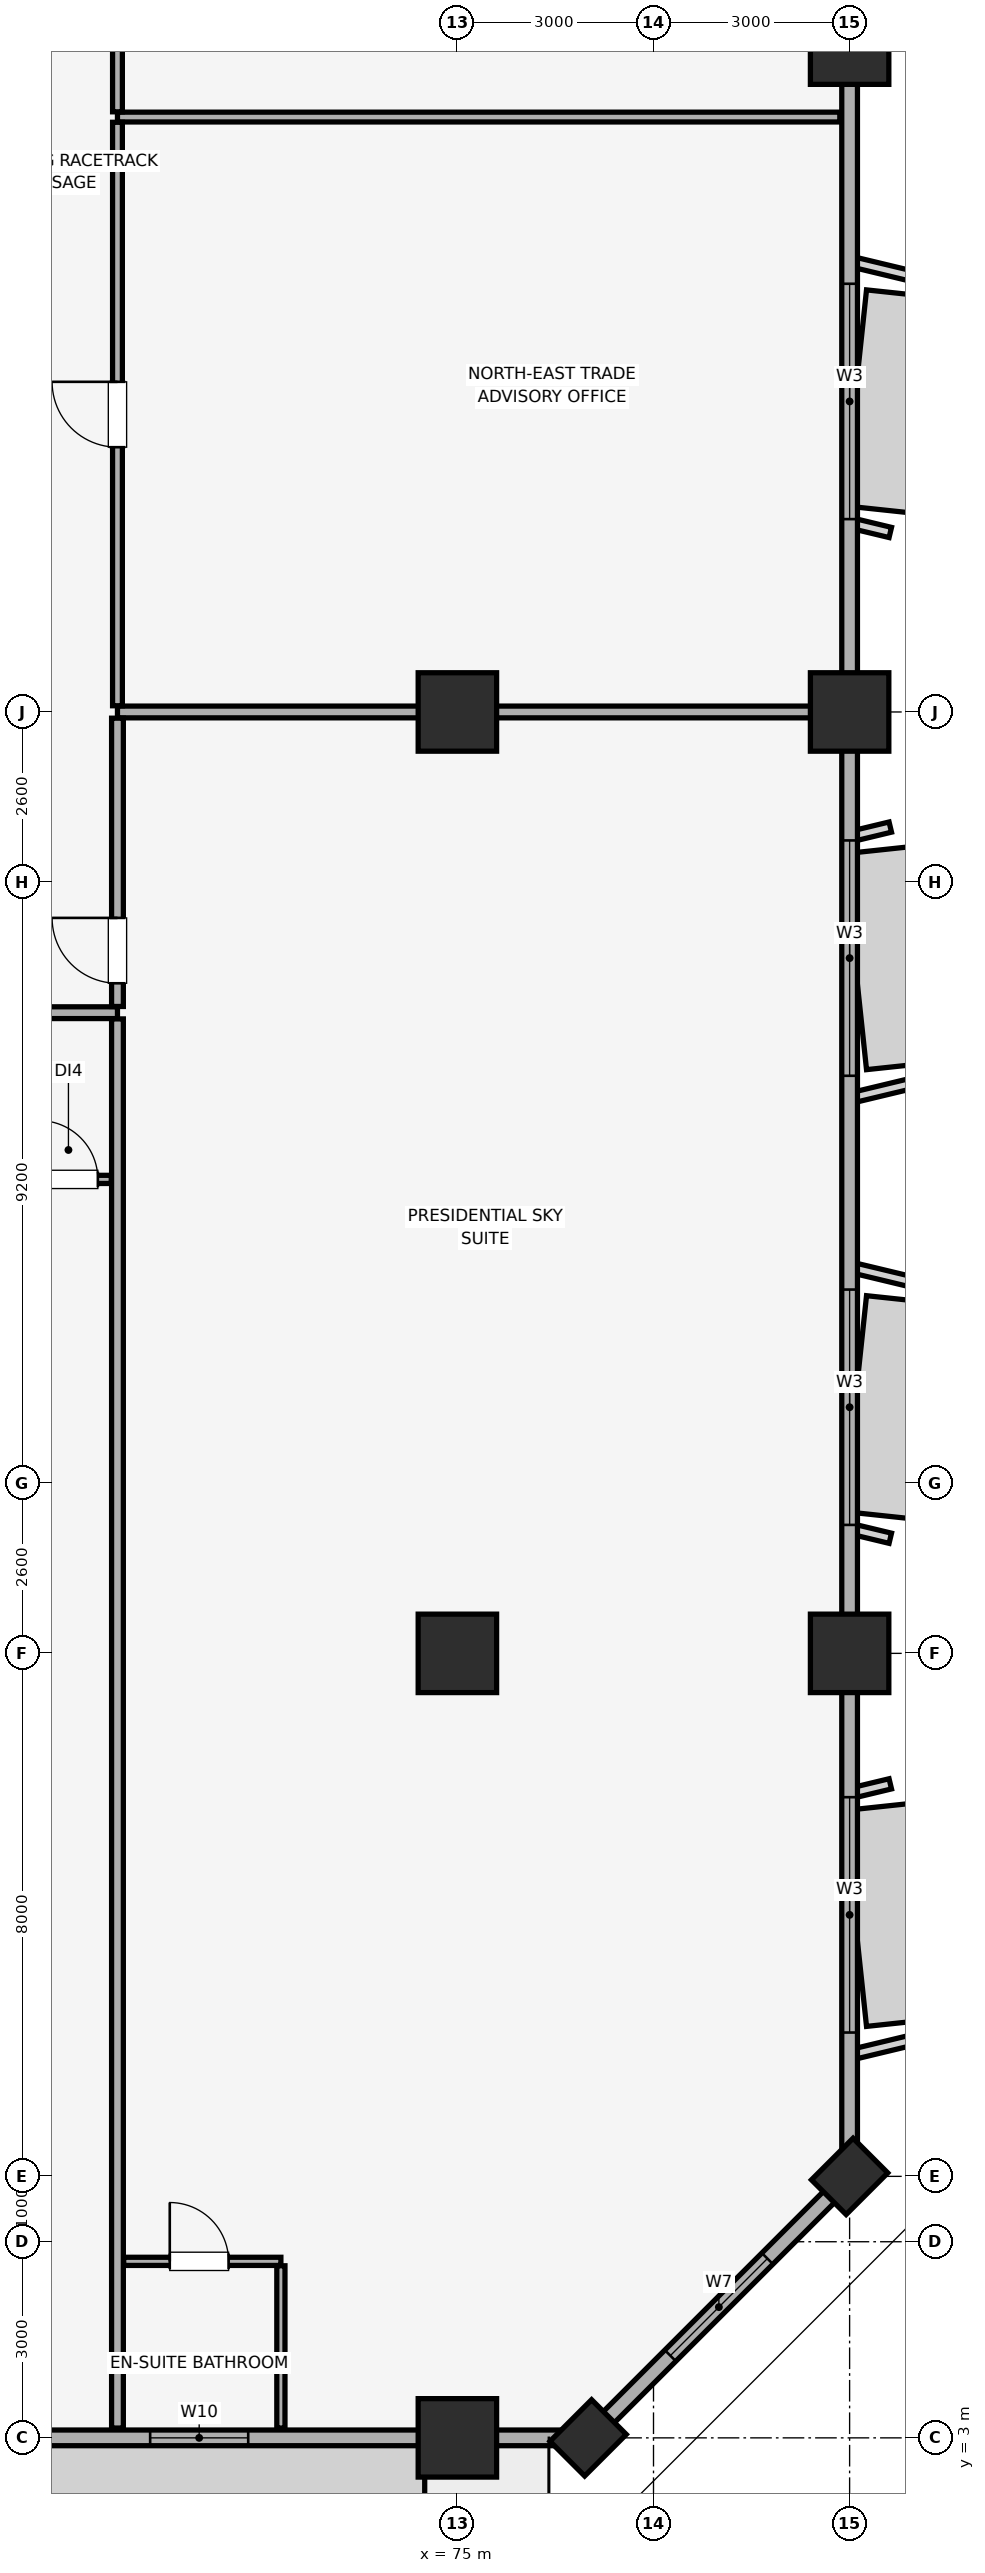
"""IFC4 building model, lengths in metres.
Left out: names, types, materials, properties, quantities, classifications, styles, units other than length and angle.
Written with IfcOpenShell. Run it as: python <this file> out.ifc"""

import sys

from ifc_helpers import new_model, si_unit, direction, frame, frame_2d, origin, origin_2d, place, context, subcontext, project, spatial, rectangle, extrude, element, fill, save


model = new_model("IFC4")
c1 = context("Model", 3, precision=1e-05, world=origin(), true_north=direction((0.0, 1.0)))
c2 = subcontext(c1, "Body", "Model", "MODEL_VIEW")
j1 = project(units=[si_unit("LENGTHUNIT", "METRE"), si_unit("PLANEANGLEUNIT", "RADIAN")], contexts=[c1])
p1 = place(None, origin())
s1 = spatial("IfcSite", under=j1, at=p1, CompositionType="ELEMENT")
p2 = place(p1, origin())
s2 = spatial("IfcBuilding", under=s1, at=p2, CompositionType="ELEMENT")
p3 = place(p2, frame((0.0, 0.0, 220.55)))
s3 = spatial("IfcBuildingStorey", under=s2, at=p3, CompositionType="ELEMENT", Elevation=220.55)
for number, where, z_axis, x_axis in (
    (1, (75.0, 3.0, 0.0), (0.0, 0.0, 1.0), (1.0, 0.0, 0.0)),
    (2, (81.0, 15.0, 0.0), (0.0, 0.0, 1.0), (1.0, 0.0, 0.0)),
    (3, (81.0, 29.4, 0.0), (0.0, 0.0, 1.0), (1.0, 0.0, 0.0)),
    (4, (81.0, 39.6, 0.0), (0.0, 0.0, 1.0), (1.0, 0.0, 0.0)),
):
    element("IfcColumn", number, at=place(p3, frame(where, z_axis=z_axis, x_axis=x_axis)), inside=s3, PredefinedType="COLUMN", context=c2, shape_type="SweptSolid", body=[
        extrude(rectangle(XDim=1.2, YDim=1.2, at=origin_2d()), origin(), (0.0, 0.0, 1.0), 3.56),
    ])
for number, where, z_axis, x_axis in (
    (5, (77.0, 3.0, 0.0), (0.0, 0.0, 1.0), (0.707, 0.707, 0.0)),
    (6, (81.0, 7.0, 0.0), (0.0, 0.0, 1.0), (0.707, 0.707, 0.0)),
):
    element("IfcColumn", number, at=place(p3, frame(where, z_axis=z_axis, x_axis=x_axis)), inside=s3, PredefinedType="PILASTER", context=c2, shape_type="SweptSolid", body=[
        extrude(rectangle(XDim=0.9, YDim=0.75, at=origin_2d()), origin(), (0.0, 0.0, 1.0), 3.56),
    ])
for number, where, z_axis, x_axis in (
    (7, (75.0, 15.0, 0.0), (0.0, 0.0, 1.0), (1.0, 0.0, 0.0)),
    (8, (75.0, 29.4, 0.0), (0.0, 0.0, 1.0), (1.0, 0.0, 0.0)),
):
    element("IfcColumn", number, at=place(p3, frame(where, z_axis=z_axis, x_axis=x_axis)), inside=s3, PredefinedType="COLUMN", context=c2, shape_type="SweptSolid", body=[
        extrude(rectangle(XDim=1.2, YDim=1.2, at=origin_2d()), origin(), (0.0, 0.0, 1.0), 3.56),
    ])
p4 = place(p3, frame((7.0, 3.0, 0.0), z_axis=(0.0, 0.0, 1.0), x_axis=(1.0, 0.0, 0.0)))
e9 = element("IfcWall", 9, at=p4, inside=s3, PredefinedType="SOLIDWALL", context=c2, shape_type="SweptSolid", body=[
    extrude(rectangle(XDim=70.0, YDim=0.24, at=frame_2d((35.0, 0.0))), origin(), (0.0, 0.0, 1.0), 2.76),
])
p5 = place(p4, frame((17.86, 0.0, 0.0)))
e10 = element("IfcOpeningElement", 10, at=p5, cuts=e9, PredefinedType="OPENING", context=c2, shape_type="SweptSolid", body=[
    extrude(rectangle(XDim=1.1, YDim=2.15, at=frame_2d((0.55, 1.075))), frame((0.0, 0.13, 0.0), z_axis=(0.0, -1.0, 0.0), x_axis=(1.0, 0.0, 0.0)), (0.0, 0.0, 1.0), 0.26),
])
p6 = place(p4, frame((26.317, 0.0, 0.0)))
e11 = element("IfcOpeningElement", 11, at=p6, cuts=e9, PredefinedType="OPENING", context=c2, shape_type="SweptSolid", body=[
    extrude(rectangle(XDim=1.1, YDim=2.15, at=frame_2d((0.55, 1.075))), frame((0.0, 0.13, 0.0), z_axis=(0.0, -1.0, 0.0), x_axis=(1.0, 0.0, 0.0)), (0.0, 0.0, 1.0), 0.26),
])
p7 = place(p4, frame((57.517, 0.0, 0.0)))
e12 = element("IfcOpeningElement", 12, at=p7, cuts=e9, PredefinedType="OPENING", context=c2, shape_type="SweptSolid", body=[
    extrude(rectangle(XDim=1.1, YDim=2.15, at=frame_2d((0.55, 1.075))), frame((0.0, 0.13, 0.0), z_axis=(0.0, -1.0, 0.0), x_axis=(1.0, 0.0, 0.0)), (0.0, 0.0, 1.0), 0.26),
])
p8 = place(p4, frame((5.2, 0.0, 0.85)))
e13 = element("IfcOpeningElement", 13, at=p8, cuts=e9, PredefinedType="OPENING", context=c2, shape_type="SweptSolid", body=[
    extrude(rectangle(XDim=1.5, YDim=1.4, at=frame_2d((0.75, 0.7))), frame((0.0, 0.13, 0.0), z_axis=(0.0, -1.0, 0.0), x_axis=(1.0, 0.0, 0.0)), (0.0, 0.0, 1.0), 0.26),
])
p9 = place(p4, frame((10.7, 0.0, 0.85)))
e14 = element("IfcOpeningElement", 14, at=p9, cuts=e9, PredefinedType="OPENING", context=c2, shape_type="SweptSolid", body=[
    extrude(rectangle(XDim=4.2, YDim=1.65, at=frame_2d((2.1, 0.825))), frame((0.0, 0.13, 0.0), z_axis=(0.0, -1.0, 0.0), x_axis=(1.0, 0.0, 0.0)), (0.0, 0.0, 1.0), 0.26),
])
p10 = place(p4, frame((28.243, 0.0, 0.85)))
e15 = element("IfcOpeningElement", 15, at=p10, cuts=e9, PredefinedType="OPENING", context=c2, shape_type="SweptSolid", body=[
    extrude(rectangle(XDim=1.5, YDim=1.4, at=frame_2d((0.75, 0.7))), frame((0.0, 0.13, 0.0), z_axis=(0.0, -1.0, 0.0), x_axis=(1.0, 0.0, 0.0)), (0.0, 0.0, 1.0), 0.26),
])
p11 = place(p4, frame((31.9, 0.0, 0.85)))
e16 = element("IfcOpeningElement", 16, at=p11, cuts=e9, PredefinedType="OPENING", context=c2, shape_type="SweptSolid", body=[
    extrude(rectangle(XDim=2.4, YDim=1.5, at=frame_2d((1.2, 0.75))), frame((0.0, 0.13, 0.0), z_axis=(0.0, -1.0, 0.0), x_axis=(1.0, 0.0, 0.0)), (0.0, 0.0, 1.0), 0.26),
])
p12 = place(p4, frame((35.7, 0.0, 0.85)))
e17 = element("IfcOpeningElement", 17, at=p12, cuts=e9, PredefinedType="OPENING", context=c2, shape_type="SweptSolid", body=[
    extrude(rectangle(XDim=2.4, YDim=1.5, at=frame_2d((1.2, 0.75))), frame((0.0, 0.13, 0.0), z_axis=(0.0, -1.0, 0.0), x_axis=(1.0, 0.0, 0.0)), (0.0, 0.0, 1.0), 0.26),
])
p13 = place(p4, frame((40.7, 0.0, 0.85)))
e18 = element("IfcOpeningElement", 18, at=p13, cuts=e9, PredefinedType="OPENING", context=c2, shape_type="SweptSolid", body=[
    extrude(rectangle(XDim=4.2, YDim=1.65, at=frame_2d((2.1, 0.825))), frame((0.0, 0.13, 0.0), z_axis=(0.0, -1.0, 0.0), x_axis=(1.0, 0.0, 0.0)), (0.0, 0.0, 1.0), 0.26),
])
p14 = place(p4, frame((49.85, 0.0, 0.85)))
e19 = element("IfcOpeningElement", 19, at=p14, cuts=e9, PredefinedType="OPENING", context=c2, shape_type="SweptSolid", body=[
    extrude(rectangle(XDim=2.4, YDim=1.5, at=frame_2d((1.2, 0.75))), frame((0.0, 0.13, 0.0), z_axis=(0.0, -1.0, 0.0), x_axis=(1.0, 0.0, 0.0)), (0.0, 0.0, 1.0), 0.26),
])
p15 = place(p4, frame((54.473, 0.0, 0.85)))
e20 = element("IfcOpeningElement", 20, at=p15, cuts=e9, PredefinedType="OPENING", context=c2, shape_type="SweptSolid", body=[
    extrude(rectangle(XDim=2.4, YDim=1.5, at=frame_2d((1.2, 0.75))), frame((0.0, 0.13, 0.0), z_axis=(0.0, -1.0, 0.0), x_axis=(1.0, 0.0, 0.0)), (0.0, 0.0, 1.0), 0.26),
])
p16 = place(p4, frame((63.3, 0.0, 0.85)))
e21 = element("IfcOpeningElement", 21, at=p16, cuts=e9, PredefinedType="OPENING", context=c2, shape_type="SweptSolid", body=[
    extrude(rectangle(XDim=1.5, YDim=1.4, at=frame_2d((0.75, 0.7))), frame((0.0, 0.13, 0.0), z_axis=(0.0, -1.0, 0.0), x_axis=(1.0, 0.0, 0.0)), (0.0, 0.0, 1.0), 0.26),
])
p17 = place(p3, frame((77.0, 3.0, 0.0), z_axis=(0.0, 0.0, 1.0), x_axis=(0.707106781187, 0.707106781187, 0.0)))
e22 = element("IfcWall", 22, at=p17, inside=s3, PredefinedType="SOLIDWALL", context=c2, shape_type="SweptSolid", body=[
    extrude(rectangle(XDim=5.657, YDim=0.24, at=frame_2d((2.828, 0.0))), origin(), (0.0, 0.0, 1.0), 2.76),
])
p18 = place(p17, frame((1.778, 0.0, 0.85)))
e23 = element("IfcOpeningElement", 23, at=p18, cuts=e22, PredefinedType="OPENING", context=c2, shape_type="SweptSolid", body=[
    extrude(rectangle(XDim=2.1, YDim=1.6, at=frame_2d((1.05, 0.8))), frame((0.0, 0.13, 0.0), z_axis=(0.0, -1.0, 0.0), x_axis=(1.0, 0.0, 0.0)), (0.0, 0.0, 1.0), 0.26),
])
p19 = place(p3, frame((81.0, 7.0, 0.0), z_axis=(0.0, 0.0, 1.0), x_axis=(0.0, 1.0, 0.0)))
e24 = element("IfcWall", 24, at=p19, inside=s3, PredefinedType="SOLIDWALL", context=c2, shape_type="SweptSolid", body=[
    extrude(rectangle(XDim=38.0, YDim=0.24, at=frame_2d((19.0, 0.0))), origin(), (0.0, 0.0, 1.0), 2.76),
])
p20 = place(p19, frame((2.2, 0.0, 0.85)))
e25 = element("IfcOpeningElement", 25, at=p20, cuts=e24, PredefinedType="OPENING", context=c2, shape_type="SweptSolid", body=[
    extrude(rectangle(XDim=3.6, YDim=1.65, at=frame_2d((1.8, 0.825))), frame((0.0, 0.13, 0.0), z_axis=(0.0, -1.0, 0.0), x_axis=(1.0, 0.0, 0.0)), (0.0, 0.0, 1.0), 0.26),
])
p21 = place(p19, frame((9.965, 0.0, 0.85)))
e26 = element("IfcOpeningElement", 26, at=p21, cuts=e24, PredefinedType="OPENING", context=c2, shape_type="SweptSolid", body=[
    extrude(rectangle(XDim=3.6, YDim=1.65, at=frame_2d((1.8, 0.825))), frame((0.0, 0.13, 0.0), z_axis=(0.0, -1.0, 0.0), x_axis=(1.0, 0.0, 0.0)), (0.0, 0.0, 1.0), 0.26),
])
p22 = place(p19, frame((16.835, 0.0, 0.85)))
e27 = element("IfcOpeningElement", 27, at=p22, cuts=e24, PredefinedType="OPENING", context=c2, shape_type="SweptSolid", body=[
    extrude(rectangle(XDim=3.6, YDim=1.65, at=frame_2d((1.8, 0.825))), frame((0.0, 0.13, 0.0), z_axis=(0.0, -1.0, 0.0), x_axis=(1.0, 0.0, 0.0)), (0.0, 0.0, 1.0), 0.26),
])
p23 = place(p19, frame((25.35, 0.0, 0.85)))
e28 = element("IfcOpeningElement", 28, at=p23, cuts=e24, PredefinedType="OPENING", context=c2, shape_type="SweptSolid", body=[
    extrude(rectangle(XDim=3.6, YDim=1.65, at=frame_2d((1.8, 0.825))), frame((0.0, 0.13, 0.0), z_axis=(0.0, -1.0, 0.0), x_axis=(1.0, 0.0, 0.0)), (0.0, 0.0, 1.0), 0.26),
])
p24 = place(p19, frame((33.915, 0.0, 0.85)))
e29 = element("IfcOpeningElement", 29, at=p24, cuts=e24, PredefinedType="OPENING", context=c2, shape_type="SweptSolid", body=[
    extrude(rectangle(XDim=3.0, YDim=1.5, at=frame_2d((1.5, 0.75))), frame((0.0, 0.13, 0.0), z_axis=(0.0, -1.0, 0.0), x_axis=(1.0, 0.0, 0.0)), (0.0, 0.0, 1.0), 0.26),
])
p25 = place(p3, frame((55.995, 24.8, 0.0), z_axis=(0.0, 0.0, 1.0), x_axis=(1.0, 0.0, 0.0)))
e30 = element("IfcWall", 30, at=p25, inside=s3, PredefinedType="PARTITIONING", context=c2, shape_type="SweptSolid", body=[
    extrude(rectangle(XDim=13.805, YDim=0.18, at=frame_2d((6.902, 0.0))), origin(), (0.0, 0.0, 1.0), 3.56),
])
p26 = place(p25, frame((7.395, 0.0, 0.0)))
e31 = element("IfcOpeningElement", 31, at=p26, cuts=e30, PredefinedType="OPENING", context=c2, shape_type="SweptSolid", body=[
    extrude(rectangle(XDim=1.0, YDim=2.15, at=frame_2d((0.5, 1.075))), frame((0.0, 0.1, 0.0), z_axis=(0.0, -1.0, 0.0), x_axis=(1.0, 0.0, 0.0)), (0.0, 0.0, 1.0), 0.2),
])
p27 = place(p3, frame((69.8, 3.15, 0.0), z_axis=(0.0, 0.0, 1.0), x_axis=(0.0, 1.0, 0.0)))
e32 = element("IfcWall", 32, at=p27, inside=s3, PredefinedType="PARTITIONING", context=c2, shape_type="SweptSolid", body=[
    extrude(rectangle(XDim=21.555, YDim=0.18, at=frame_2d((10.778, 0.0))), origin(), (0.0, 0.0, 1.0), 3.56),
])
p28 = place(p3, frame((67.3, 22.25, 0.0), z_axis=(0.0, 0.0, 1.0), x_axis=(1.0, 0.0, 0.0)))
e33 = element("IfcWall", 33, at=p28, inside=s3, PredefinedType="PARTITIONING", context=c2, shape_type="SweptSolid", body=[
    extrude(rectangle(XDim=2.405, YDim=0.125, at=frame_2d((1.203, 0.0))), origin(), (0.0, 0.0, 1.0), 3.56),
])
p29 = place(p28, frame((1.3, 0.0, 0.0)))
e34 = element("IfcOpeningElement", 34, at=p29, cuts=e33, PredefinedType="OPENING", context=c2, shape_type="SweptSolid", body=[
    extrude(rectangle(XDim=0.9, YDim=2.1, at=frame_2d((0.45, 1.05))), frame((0.0, 0.073, 0.0), z_axis=(0.0, -1.0, 0.0), x_axis=(1.0, 0.0, 0.0)), (0.0, 0.0, 1.0), 0.145),
])
p30 = place(p3, frame((69.8, 29.4, 0.0), z_axis=(0.0, 0.0, 1.0), x_axis=(1.0, 0.0, 0.0)))
e35 = element("IfcWall", 35, at=p30, inside=s3, PredefinedType="PARTITIONING", context=c2, shape_type="SweptSolid", body=[
    extrude(rectangle(XDim=11.05, YDim=0.18, at=frame_2d((5.525, 0.0))), origin(), (0.0, 0.0, 1.0), 2.719),
])
p31 = place(p3, frame((69.8, 24.895, 0.0), z_axis=(0.0, 0.0, 1.0), x_axis=(0.0, 1.0, 0.0)))
e36 = element("IfcWall", 36, at=p31, inside=s3, PredefinedType="PARTITIONING", context=c2, shape_type="SweptSolid", body=[
    extrude(rectangle(XDim=4.41, YDim=0.18, at=frame_2d((2.205, 0.0))), origin(), (0.0, 0.0, 1.0), 3.56),
])
p32 = place(p31, frame((0.355, 0.0, 0.0)))
e37 = element("IfcOpeningElement", 37, at=p32, cuts=e36, PredefinedType="OPENING", context=c2, shape_type="SweptSolid", body=[
    extrude(rectangle(XDim=1.0, YDim=2.15, at=frame_2d((0.5, 1.075))), frame((0.0, 0.1, 0.0), z_axis=(0.0, -1.0, 0.0), x_axis=(1.0, 0.0, 0.0)), (0.0, 0.0, 1.0), 0.2),
])
p33 = place(p3, frame((69.895, 5.7, 0.0), z_axis=(0.0, 0.0, 1.0), x_axis=(1.0, 0.0, 0.0)))
e38 = element("IfcWall", 38, at=p33, inside=s3, PredefinedType="PARTITIONING", context=c2, shape_type="SweptSolid", body=[
    extrude(rectangle(XDim=2.405, YDim=0.125, at=frame_2d((1.203, 0.0))), origin(), (0.0, 0.0, 1.0), 3.56),
])
p34 = place(p33, frame((0.705, 0.0, 0.0)))
e39 = element("IfcOpeningElement", 39, at=p34, cuts=e38, PredefinedType="OPENING", context=c2, shape_type="SweptSolid", body=[
    extrude(rectangle(XDim=0.9, YDim=2.1, at=frame_2d((0.45, 1.05))), frame((0.0, 0.073, 0.0), z_axis=(0.0, -1.0, 0.0), x_axis=(1.0, 0.0, 0.0)), (0.0, 0.0, 1.0), 0.145),
])
p35 = place(p3, frame((72.3, 3.15, 0.0), z_axis=(0.0, 0.0, 1.0), x_axis=(0.0, 1.0, 0.0)))
e40 = element("IfcWall", 40, at=p35, inside=s3, PredefinedType="PARTITIONING", context=c2, shape_type="SweptSolid", body=[
    extrude(rectangle(XDim=2.483, YDim=0.125, at=frame_2d((1.241, 0.0))), origin(), (0.0, 0.0, 1.0), 3.56),
])
p36 = place(p3, frame((69.8, 38.5, 0.0), z_axis=(0.0, 0.0, 1.0), x_axis=(1.0, 0.0, 0.0)))
e41 = element("IfcWall", 41, at=p36, inside=s3, PredefinedType="PARTITIONING", context=c2, shape_type="SweptSolid", body=[
    extrude(rectangle(XDim=11.05, YDim=0.15, at=frame_2d((5.525, 0.0))), origin(), (0.0, 0.0, 1.0), 3.56),
])
p37 = place(p3, frame((69.8, 29.495, 0.0), z_axis=(0.0, 0.0, 1.0), x_axis=(0.0, 1.0, 0.0)))
e42 = element("IfcWall", 42, at=p37, inside=s3, PredefinedType="PARTITIONING", context=c2, shape_type="SweptSolid", body=[
    extrude(rectangle(XDim=8.925, YDim=0.15, at=frame_2d((4.462, 0.0))), origin(), (0.0, 0.0, 1.0), 3.56),
])
p38 = place(p37, frame((3.955, 0.0, 0.0)))
e43 = element("IfcOpeningElement", 43, at=p38, cuts=e42, PredefinedType="OPENING", context=c2, shape_type="SweptSolid", body=[
    extrude(rectangle(XDim=1.0, YDim=2.15, at=frame_2d((0.5, 1.075))), frame((0.0, 0.085, 0.0), z_axis=(0.0, -1.0, 0.0), x_axis=(1.0, 0.0, 0.0)), (0.0, 0.0, 1.0), 0.17),
])
p39 = place(p3, frame((69.8, 38.58, 0.0), z_axis=(0.0, 0.0, 1.0), x_axis=(0.0, 1.0, 0.0)))
e44 = element("IfcWall", 44, at=p39, inside=s3, PredefinedType="PARTITIONING", context=c2, shape_type="SweptSolid", body=[
    extrude(rectangle(XDim=10.27, YDim=0.15, at=frame_2d((5.135, 0.0))), origin(), (0.0, 0.0, 1.0), 3.56),
])
p40 = place(p39, frame((2.27, 0.0, 0.0)))
e45 = element("IfcOpeningElement", 45, at=p40, cuts=e44, PredefinedType="OPENING", context=c2, shape_type="SweptSolid", body=[
    extrude(rectangle(XDim=1.0, YDim=2.15, at=frame_2d((0.5, 1.075))), frame((0.0, 0.085, 0.0), z_axis=(0.0, -1.0, 0.0), x_axis=(1.0, 0.0, 0.0)), (0.0, 0.0, 1.0), 0.17),
])
p41 = place(p18, origin())
e46 = element("IfcWindow", 46, at=p41, inside=s3, PartitioningType="SINGLE_PANEL", PredefinedType="WINDOW", context=c2, shape_type="SweptSolid", body=[
    extrude(rectangle(XDim=2.1, YDim=1.6, at=frame_2d((1.05, 0.8))), frame((0.0, 0.03, 0.0), z_axis=(0.0, -1.0, 0.0), x_axis=(1.0, 0.0, 0.0)), (0.0, 0.0, 1.0), 0.06),
])
fill(e23, e46)
p42 = place(p16, origin())
e47 = element("IfcWindow", 47, at=p42, inside=s3, PartitioningType="SINGLE_PANEL", PredefinedType="WINDOW", context=c2, shape_type="SweptSolid", body=[
    extrude(rectangle(XDim=1.5, YDim=1.4, at=frame_2d((0.75, 0.7))), frame((0.0, 0.03, 0.0), z_axis=(0.0, -1.0, 0.0), x_axis=(1.0, 0.0, 0.0)), (0.0, 0.0, 1.0), 0.06),
])
fill(e21, e47)
p43 = place(p20, origin())
e48 = element("IfcWindow", 48, at=p43, inside=s3, PartitioningType="SINGLE_PANEL", PredefinedType="WINDOW", context=c2, shape_type="SweptSolid", body=[
    extrude(rectangle(XDim=3.6, YDim=1.65, at=frame_2d((1.8, 0.825))), frame((0.0, 0.03, 0.0), z_axis=(0.0, -1.0, 0.0), x_axis=(1.0, 0.0, 0.0)), (0.0, 0.0, 1.0), 0.06),
])
fill(e25, e48)
p44 = place(p21, origin())
e49 = element("IfcWindow", 49, at=p44, inside=s3, PartitioningType="SINGLE_PANEL", PredefinedType="WINDOW", context=c2, shape_type="SweptSolid", body=[
    extrude(rectangle(XDim=3.6, YDim=1.65, at=frame_2d((1.8, 0.825))), frame((0.0, 0.03, 0.0), z_axis=(0.0, -1.0, 0.0), x_axis=(1.0, 0.0, 0.0)), (0.0, 0.0, 1.0), 0.06),
])
fill(e26, e49)
p45 = place(p22, origin())
e50 = element("IfcWindow", 50, at=p45, inside=s3, PartitioningType="SINGLE_PANEL", PredefinedType="WINDOW", context=c2, shape_type="SweptSolid", body=[
    extrude(rectangle(XDim=3.6, YDim=1.65, at=frame_2d((1.8, 0.825))), frame((0.0, 0.03, 0.0), z_axis=(0.0, -1.0, 0.0), x_axis=(1.0, 0.0, 0.0)), (0.0, 0.0, 1.0), 0.06),
])
fill(e27, e50)
p46 = place(p23, origin())
e51 = element("IfcWindow", 51, at=p46, inside=s3, PartitioningType="SINGLE_PANEL", PredefinedType="WINDOW", context=c2, shape_type="SweptSolid", body=[
    extrude(rectangle(XDim=3.6, YDim=1.65, at=frame_2d((1.8, 0.825))), frame((0.0, 0.03, 0.0), z_axis=(0.0, -1.0, 0.0), x_axis=(1.0, 0.0, 0.0)), (0.0, 0.0, 1.0), 0.06),
])
fill(e28, e51)
p47 = place(p29, origin())
e52 = element("IfcDoor", 52, at=p47, inside=s3, OperationType="SINGLE_SWING_LEFT", PredefinedType="DOOR", context=c2, shape_type="SweptSolid", body=[
    extrude(rectangle(XDim=0.9, YDim=2.1, at=frame_2d((0.45, 1.05))), frame((0.0, 0.025, 0.0), z_axis=(0.0, -1.0, 0.0), x_axis=(1.0, 0.0, 0.0)), (0.0, 0.0, 1.0), 0.05),
])
fill(e34, e52)
p48 = place(p32, origin())
e53 = element("IfcDoor", 53, at=p48, inside=s3, OperationType="SINGLE_SWING_RIGHT", PredefinedType="DOOR", context=c2, shape_type="SweptSolid", body=[
    extrude(rectangle(XDim=1.0, YDim=2.15, at=frame_2d((0.5, 1.075))), frame((0.0, 0.025, 0.0), z_axis=(0.0, -1.0, 0.0), x_axis=(1.0, 0.0, 0.0)), (0.0, 0.0, 1.0), 0.05),
])
fill(e37, e53)
p49 = place(p34, origin())
e54 = element("IfcDoor", 54, at=p49, inside=s3, OperationType="SINGLE_SWING_LEFT", PredefinedType="DOOR", context=c2, shape_type="SweptSolid", body=[
    extrude(rectangle(XDim=0.9, YDim=2.1, at=frame_2d((0.45, 1.05))), frame((0.0, 0.025, 0.0), z_axis=(0.0, -1.0, 0.0), x_axis=(1.0, 0.0, 0.0)), (0.0, 0.0, 1.0), 0.05),
])
fill(e39, e54)
p50 = place(p38, origin())
e55 = element("IfcDoor", 55, at=p50, inside=s3, OperationType="SINGLE_SWING_RIGHT", PredefinedType="DOOR", context=c2, shape_type="SweptSolid", body=[
    extrude(rectangle(XDim=1.0, YDim=2.15, at=frame_2d((0.5, 1.075))), frame((0.0, 0.025, 0.0), z_axis=(0.0, -1.0, 0.0), x_axis=(1.0, 0.0, 0.0)), (0.0, 0.0, 1.0), 0.05),
])
fill(e43, e55)
save(model, sys.argv[1])
